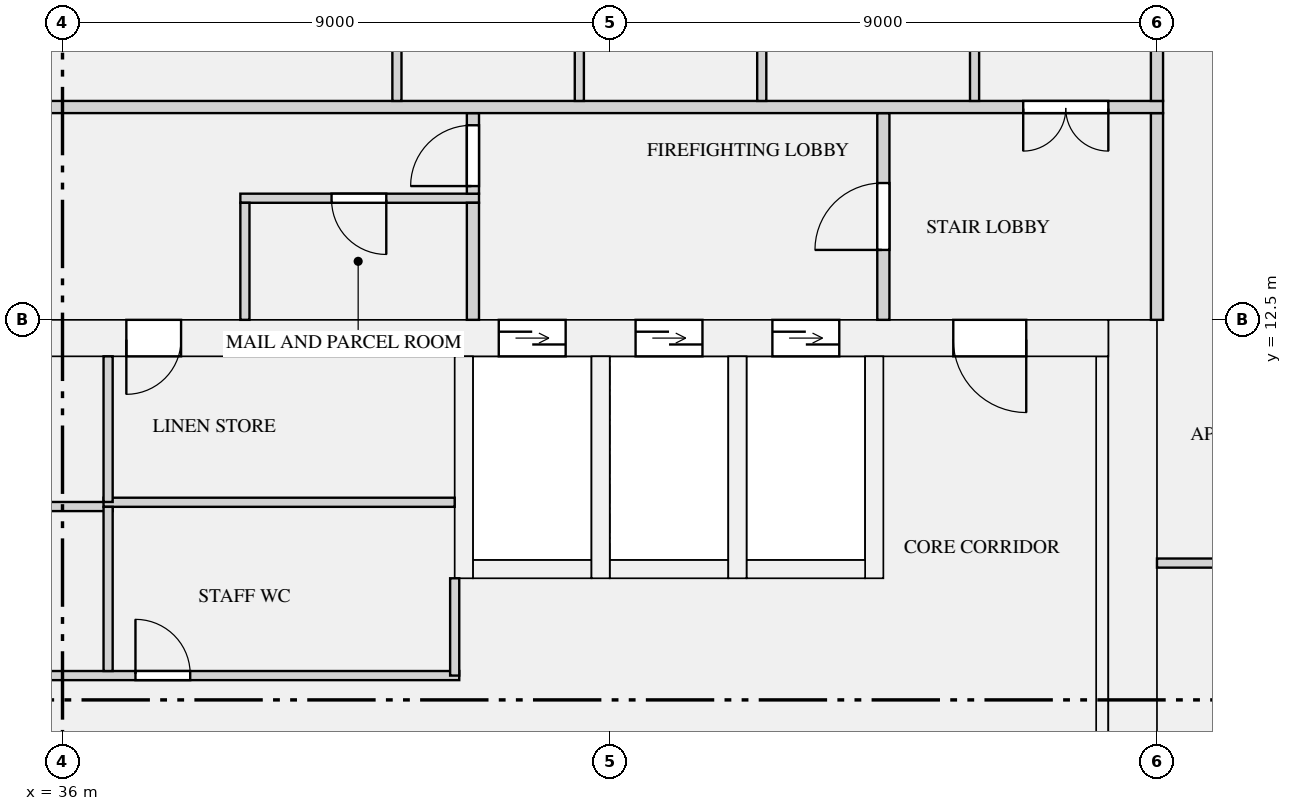
"""IFC4 building model, lengths in metres.
Left out: names, types, materials, properties, quantities, classifications, styles, units other than length and angle.
Written with IfcOpenShell. Run it as: python <this file> out.ifc"""

import sys

from ifc_helpers import new_model, si_unit, direction, frame, frame_2d, origin, place, context, subcontext, project, spatial, rectangle, extrude, element, fill, save


model = new_model("IFC4")
c1 = context("Model", 3, precision=1e-05, world=origin(), true_north=direction((0.0, 1.0)))
c2 = subcontext(c1, "Body", "Model", "MODEL_VIEW")
j1 = project(units=[si_unit("LENGTHUNIT", "METRE"), si_unit("PLANEANGLEUNIT", "RADIAN")], contexts=[c1])
p1 = place(None, origin())
s1 = spatial("IfcSite", under=j1, at=p1, CompositionType="ELEMENT")
p2 = place(p1, origin())
s2 = spatial("IfcBuilding", under=s1, at=p2, CompositionType="ELEMENT")
p3 = place(p2, frame((0.0, 0.0, 124.5)))
s3 = spatial("IfcBuildingStorey", under=s2, at=p3, CompositionType="ELEMENT", Elevation=124.5)
p4 = place(p3, frame((53.6, 0.0, 0.0), z_axis=(0.0, 0.0, 1.0), x_axis=(0.0, 1.0, 0.0)))
e1 = element("IfcWall", 1, at=p4, inside=s3, PredefinedType="SHEAR", context=c2, shape_type="SweptSolid", body=[
    extrude(rectangle(XDim=12.5, YDim=0.8, at=frame_2d((6.25, 0.0))), origin(), (0.0, 0.0, 1.0), 3.15),
])
p5 = place(p3, frame((18.8, 12.2, 0.0), z_axis=(0.0, 0.0, 1.0), x_axis=(1.0, 0.0, 0.0)))
e2 = element("IfcWall", 2, at=p5, inside=s3, PredefinedType="SHEAR", context=c2, shape_type="SweptSolid", body=[
    extrude(rectangle(XDim=34.4, YDim=0.6, at=frame_2d((17.2, 0.0))), origin(), (0.0, 0.0, 1.0), 3.15),
])
p6 = place(p5, frame((24.375, 0.0, 0.0)))
e3 = element("IfcOpeningElement", 3, at=p6, cuts=e2, PredefinedType="OPENING", context=c2, shape_type="SweptSolid", body=[
    extrude(rectangle(XDim=1.1, YDim=2.1, at=frame_2d((0.55, 1.05))), frame((0.0, 0.31, 0.0), z_axis=(0.0, -1.0, 0.0), x_axis=(1.0, 0.0, 0.0)), (0.0, 0.0, 1.0), 0.62),
])
p7 = place(p5, frame((26.625, 0.0, 0.0)))
e4 = element("IfcOpeningElement", 4, at=p7, cuts=e2, PredefinedType="OPENING", context=c2, shape_type="SweptSolid", body=[
    extrude(rectangle(XDim=1.1, YDim=2.1, at=frame_2d((0.55, 1.05))), frame((0.0, 0.31, 0.0), z_axis=(0.0, -1.0, 0.0), x_axis=(1.0, 0.0, 0.0)), (0.0, 0.0, 1.0), 0.62),
])
p8 = place(p5, frame((28.875, 0.0, 0.0)))
e5 = element("IfcOpeningElement", 5, at=p8, cuts=e2, PredefinedType="OPENING", context=c2, shape_type="SweptSolid", body=[
    extrude(rectangle(XDim=1.1, YDim=2.1, at=frame_2d((0.55, 1.05))), frame((0.0, 0.31, 0.0), z_axis=(0.0, -1.0, 0.0), x_axis=(1.0, 0.0, 0.0)), (0.0, 0.0, 1.0), 0.62),
])
p9 = place(p5, frame((4.75, 0.0, 0.0)))
e6 = element("IfcOpeningElement", 6, at=p9, cuts=e2, PredefinedType="OPENING", context=c2, shape_type="SweptSolid", body=[
    extrude(rectangle(XDim=0.9, YDim=2.1, at=frame_2d((0.45, 1.05))), frame((0.0, 0.31, 0.0), z_axis=(0.0, -1.0, 0.0), x_axis=(1.0, 0.0, 0.0)), (0.0, 0.0, 1.0), 0.62),
])
p10 = place(p5, frame((11.75, 0.0, 0.0)))
e7 = element("IfcOpeningElement", 7, at=p10, cuts=e2, PredefinedType="OPENING", context=c2, shape_type="SweptSolid", body=[
    extrude(rectangle(XDim=0.9, YDim=2.1, at=frame_2d((0.45, 1.05))), frame((0.0, 0.31, 0.0), z_axis=(0.0, -1.0, 0.0), x_axis=(1.0, 0.0, 0.0)), (0.0, 0.0, 1.0), 0.62),
])
p11 = place(p5, frame((18.25, 0.0, 0.0)))
e8 = element("IfcOpeningElement", 8, at=p11, cuts=e2, PredefinedType="OPENING", context=c2, shape_type="SweptSolid", body=[
    extrude(rectangle(XDim=0.9, YDim=2.1, at=frame_2d((0.45, 1.05))), frame((0.0, 0.31, 0.0), z_axis=(0.0, -1.0, 0.0), x_axis=(1.0, 0.0, 0.0)), (0.0, 0.0, 1.0), 0.62),
])
p12 = place(p5, frame((1.35, 0.0, 0.0)))
e9 = element("IfcOpeningElement", 9, at=p12, cuts=e2, PredefinedType="OPENING", context=c2, shape_type="SweptSolid", body=[
    extrude(rectangle(XDim=1.2, YDim=2.1, at=frame_2d((0.6, 1.05))), frame((0.0, 0.31, 0.0), z_axis=(0.0, -1.0, 0.0), x_axis=(1.0, 0.0, 0.0)), (0.0, 0.0, 1.0), 0.62),
])
p13 = place(p5, frame((31.85, 0.0, 0.0)))
e10 = element("IfcOpeningElement", 10, at=p13, cuts=e2, PredefinedType="OPENING", context=c2, shape_type="SweptSolid", body=[
    extrude(rectangle(XDim=1.2, YDim=2.1, at=frame_2d((0.6, 1.05))), frame((0.0, 0.31, 0.0), z_axis=(0.0, -1.0, 0.0), x_axis=(1.0, 0.0, 0.0)), (0.0, 0.0, 1.0), 0.62),
])
p14 = place(p3, frame((53.1, 1.0, 0.0), z_axis=(0.0, 0.0, 1.0), x_axis=(0.0, 1.0, 0.0)))
e11 = element("IfcWall", 11, at=p14, inside=s3, PredefinedType="SHEAR", context=c2, shape_type="SweptSolid", body=[
    extrude(rectangle(XDim=10.9, YDim=0.2, at=frame_2d((5.45, 0.0))), origin(), (0.0, 0.0, 1.0), 3.15),
])
p15 = place(p3, frame((42.75, 8.4, 0.0), z_axis=(0.0, 0.0, 1.0), x_axis=(1.0, 0.0, 0.0)))
e12 = element("IfcWall", 12, at=p15, inside=s3, PredefinedType="SHEAR", context=c2, shape_type="SweptSolid", body=[
    extrude(rectangle(XDim=1.95, YDim=0.3, at=frame_2d((0.975, 0.0))), origin(), (0.0, 0.0, 1.0), 3.15),
])
p16 = place(p3, frame((42.6, 8.25, 0.0), z_axis=(0.0, 0.0, 1.0), x_axis=(0.0, 1.0, 0.0)))
e13 = element("IfcWall", 13, at=p16, inside=s3, PredefinedType="SHEAR", context=c2, shape_type="SweptSolid", body=[
    extrude(rectangle(XDim=3.65, YDim=0.3, at=frame_2d((1.825, 0.0))), origin(), (0.0, 0.0, 1.0), 3.15),
])
p17 = place(p3, frame((45.0, 8.4, 0.0), z_axis=(0.0, 0.0, 1.0), x_axis=(1.0, 0.0, 0.0)))
e14 = element("IfcWall", 14, at=p17, inside=s3, PredefinedType="SHEAR", context=c2, shape_type="SweptSolid", body=[
    extrude(rectangle(XDim=1.95, YDim=0.3, at=frame_2d((0.975, 0.0))), origin(), (0.0, 0.0, 1.0), 3.15),
])
p18 = place(p3, frame((44.85, 8.25, 0.0), z_axis=(0.0, 0.0, 1.0), x_axis=(0.0, 1.0, 0.0)))
e15 = element("IfcWall", 15, at=p18, inside=s3, PredefinedType="SHEAR", context=c2, shape_type="SweptSolid", body=[
    extrude(rectangle(XDim=3.65, YDim=0.3, at=frame_2d((1.825, 0.0))), origin(), (0.0, 0.0, 1.0), 3.15),
])
p19 = place(p3, frame((47.25, 8.4, 0.0), z_axis=(0.0, 0.0, 1.0), x_axis=(1.0, 0.0, 0.0)))
e16 = element("IfcWall", 16, at=p19, inside=s3, PredefinedType="SHEAR", context=c2, shape_type="SweptSolid", body=[
    extrude(rectangle(XDim=1.95, YDim=0.3, at=frame_2d((0.975, 0.0))), origin(), (0.0, 0.0, 1.0), 3.15),
])
for number, where, z_axis, x_axis in (
    (17, (47.1, 8.25, 0.0), (0.0, 0.0, 1.0), (0.0, 1.0, 0.0)),
    (18, (49.35, 8.25, 0.0), (0.0, 0.0, 1.0), (0.0, 1.0, 0.0)),
):
    element("IfcWall", number, at=place(p3, frame(where, z_axis=z_axis, x_axis=x_axis)), inside=s3, PredefinedType="SHEAR", context=c2, shape_type="SweptSolid", body=[
        extrude(rectangle(XDim=3.65, YDim=0.3, at=frame_2d((1.825, 0.0))), origin(), (0.0, 0.0, 1.0), 3.15),
    ])
p20 = place(p3, frame((22.725, 6.65, 0.0), z_axis=(0.0, 0.0, 1.0), x_axis=(1.0, 0.0, 0.0)))
e19 = element("IfcWall", 19, at=p20, inside=s3, PredefinedType="PARTITIONING", context=c2, shape_type="SweptSolid", body=[
    extrude(rectangle(XDim=19.8, YDim=0.15, at=frame_2d((9.9, 0.0))), origin(), (0.0, 0.0, 1.0), 2.83),
])
p21 = place(p20, frame((0.825, 0.0, 0.0)))
e20 = element("IfcOpeningElement", 20, at=p21, cuts=e19, PredefinedType="OPENING", context=c2, shape_type="SweptSolid", body=[
    extrude(rectangle(XDim=0.9, YDim=2.1, at=frame_2d((0.45, 1.05))), frame((0.0, 0.085, 0.0), z_axis=(0.0, -1.0, 0.0), x_axis=(1.0, 0.0, 0.0)), (0.0, 0.0, 1.0), 0.17),
])
p22 = place(p20, frame((7.825, 0.0, 0.0)))
e21 = element("IfcOpeningElement", 21, at=p22, cuts=e19, PredefinedType="OPENING", context=c2, shape_type="SweptSolid", body=[
    extrude(rectangle(XDim=0.9, YDim=2.1, at=frame_2d((0.45, 1.05))), frame((0.0, 0.085, 0.0), z_axis=(0.0, -1.0, 0.0), x_axis=(1.0, 0.0, 0.0)), (0.0, 0.0, 1.0), 0.17),
])
p23 = place(p20, frame((14.475, 0.0, 0.0)))
e22 = element("IfcOpeningElement", 22, at=p23, cuts=e19, PredefinedType="OPENING", context=c2, shape_type="SweptSolid", body=[
    extrude(rectangle(XDim=0.9, YDim=2.1, at=frame_2d((0.45, 1.05))), frame((0.0, 0.085, 0.0), z_axis=(0.0, -1.0, 0.0), x_axis=(1.0, 0.0, 0.0)), (0.0, 0.0, 1.0), 0.17),
])
p24 = place(p3, frame((22.725, 9.43, 0.0), z_axis=(0.0, 0.0, 1.0), x_axis=(1.0, 0.0, 0.0)))
e23 = element("IfcWall", 23, at=p24, inside=s3, PredefinedType="PARTITIONING", context=c2, shape_type="SweptSolid", body=[
    extrude(rectangle(XDim=14.1, YDim=0.15, at=frame_2d((7.05, 0.0))), origin(), (0.0, 0.0, 1.0), 2.83),
])
p25 = place(p3, frame((36.675, 9.5, 0.0), z_axis=(0.0, 0.0, 1.0), x_axis=(1.0, 0.0, 0.0)))
e24 = element("IfcWall", 24, at=p25, inside=s3, PredefinedType="PARTITIONING", context=c2, shape_type="SweptSolid", body=[
    extrude(rectangle(XDim=5.775, YDim=0.15, at=frame_2d((2.887, 0.0))), origin(), (0.0, 0.0, 1.0), 2.83),
])
p26 = place(p3, frame((38.925, 14.5, 0.0), z_axis=(0.0, 0.0, 1.0), x_axis=(1.0, 0.0, 0.0)))
e25 = element("IfcWall", 25, at=p26, inside=s3, PredefinedType="PARTITIONING", context=c2, shape_type="SweptSolid", body=[
    extrude(rectangle(XDim=3.925, YDim=0.15, at=frame_2d((1.962, 0.0))), origin(), (0.0, 0.0, 1.0), 2.83),
])
p27 = place(p26, frame((1.5, 0.0, 0.0)))
e26 = element("IfcOpeningElement", 26, at=p27, cuts=e25, PredefinedType="OPENING", context=c2, shape_type="SweptSolid", body=[
    extrude(rectangle(XDim=0.9, YDim=2.1, at=frame_2d((0.45, 1.05))), frame((0.0, 0.085, 0.0), z_axis=(0.0, -1.0, 0.0), x_axis=(1.0, 0.0, 0.0)), (0.0, 0.0, 1.0), 0.17),
])
p28 = place(p3, frame((42.45, 6.65, 0.0), z_axis=(0.0, 0.0, 1.0), x_axis=(0.0, 1.0, 0.0)))
e27 = element("IfcWall", 27, at=p28, inside=s3, PredefinedType="PARTITIONING", context=c2, shape_type="SweptSolid", body=[
    extrude(rectangle(XDim=1.6, YDim=0.15, at=frame_2d((0.8, 0.0))), origin(), (0.0, 0.0, 1.0), 2.83),
])
p29 = place(p3, frame((36.75, 6.725, 0.0), z_axis=(0.0, 0.0, 1.0), x_axis=(0.0, 1.0, 0.0)))
e28 = element("IfcWall", 28, at=p29, inside=s3, PredefinedType="PARTITIONING", context=c2, shape_type="SweptSolid", body=[
    extrude(rectangle(XDim=2.7, YDim=0.15, at=frame_2d((1.35, 0.0))), origin(), (0.0, 0.0, 1.0), 2.83),
])
p30 = place(p3, frame((36.75, 9.505, 0.0), z_axis=(0.0, 0.0, 1.0), x_axis=(0.0, 1.0, 0.0)))
e29 = element("IfcWall", 29, at=p30, inside=s3, PredefinedType="PARTITIONING", context=c2, shape_type="SweptSolid", body=[
    extrude(rectangle(XDim=2.395, YDim=0.15, at=frame_2d((1.198, 0.0))), origin(), (0.0, 0.0, 1.0), 2.83),
])
p31 = place(p3, frame((39.0, 12.5, 0.0), z_axis=(0.0, 0.0, 1.0), x_axis=(0.0, 1.0, 0.0)))
e30 = element("IfcWall", 30, at=p31, inside=s3, PredefinedType="PARTITIONING", context=c2, shape_type="SweptSolid", body=[
    extrude(rectangle(XDim=1.925, YDim=0.15, at=frame_2d((0.962, 0.0))), origin(), (0.0, 0.0, 1.0), 2.83),
])
p32 = place(p3, frame((42.75, 12.5, 0.0), z_axis=(0.0, 0.0, 1.0), x_axis=(0.0, 1.0, 0.0)))
e31 = element("IfcWall", 31, at=p32, inside=s3, PredefinedType="PARTITIONING", context=c2, shape_type="SweptSolid", body=[
    extrude(rectangle(XDim=1.925, YDim=0.2, at=frame_2d((0.962, 0.0))), origin(), (0.0, 0.0, 1.0), 2.83),
])
p33 = place(p3, frame((49.5, 12.5, 0.0), z_axis=(0.0, 0.0, 1.0), x_axis=(0.0, 1.0, 0.0)))
e32 = element("IfcWall", 32, at=p33, inside=s3, PredefinedType="PARTITIONING", context=c2, shape_type="SweptSolid", body=[
    extrude(rectangle(XDim=3.4, YDim=0.2, at=frame_2d((1.7, 0.0))), origin(), (0.0, 0.0, 1.0), 2.83),
])
p34 = place(p33, frame((1.15, 0.0, 0.0)))
e33 = element("IfcOpeningElement", 33, at=p34, cuts=e32, PredefinedType="OPENING", context=c2, shape_type="SweptSolid", body=[
    extrude(rectangle(XDim=1.1, YDim=2.1, at=frame_2d((0.55, 1.05))), frame((0.0, 0.11, 0.0), z_axis=(0.0, -1.0, 0.0), x_axis=(1.0, 0.0, 0.0)), (0.0, 0.0, 1.0), 0.22),
])
p35 = place(p3, frame((54.0, 12.5, 0.0), z_axis=(0.0, 0.0, 1.0), x_axis=(0.0, 1.0, 0.0)))
e34 = element("IfcWall", 34, at=p35, inside=s3, PredefinedType="PARTITIONING", context=c2, shape_type="SweptSolid", body=[
    extrude(rectangle(XDim=3.4, YDim=0.2, at=frame_2d((1.7, 0.0))), origin(), (0.0, 0.0, 1.0), 2.83),
])
p36 = place(p3, frame((42.75, 14.575, 0.0), z_axis=(0.0, 0.0, 1.0), x_axis=(0.0, 1.0, 0.0)))
e35 = element("IfcWall", 35, at=p36, inside=s3, PredefinedType="PARTITIONING", context=c2, shape_type="SweptSolid", body=[
    extrude(rectangle(XDim=1.325, YDim=0.2, at=frame_2d((0.663, 0.0))), origin(), (0.0, 0.0, 1.0), 2.83),
])
p37 = place(p36, frame((0.125, 0.0, 0.0)))
e36 = element("IfcOpeningElement", 36, at=p37, cuts=e35, PredefinedType="OPENING", context=c2, shape_type="SweptSolid", body=[
    extrude(rectangle(XDim=1.0, YDim=2.1, at=frame_2d((0.5, 1.05))), frame((0.0, 0.11, 0.0), z_axis=(0.0, -1.0, 0.0), x_axis=(1.0, 0.0, 0.0)), (0.0, 0.0, 1.0), 0.22),
])
p38 = place(p3, frame((54.0, 8.5, 0.0), z_axis=(0.0, 0.0, 1.0), x_axis=(1.0, 0.0, 0.0)))
e37 = element("IfcWall", 37, at=p38, inside=s3, PredefinedType="PARTITIONING", context=c2, shape_type="SweptSolid", body=[
    extrude(rectangle(XDim=17.925, YDim=0.15, at=frame_2d((8.962, 0.0))), origin(), (0.0, 0.0, 1.0), 2.83),
])
p39 = place(p38, frame((1.8, 0.0, 0.0)))
e38 = element("IfcOpeningElement", 38, at=p39, cuts=e37, PredefinedType="OPENING", context=c2, shape_type="SweptSolid", body=[
    extrude(rectangle(XDim=0.9, YDim=2.1, at=frame_2d((0.45, 1.05))), frame((0.0, 0.085, 0.0), z_axis=(0.0, -1.0, 0.0), x_axis=(1.0, 0.0, 0.0)), (0.0, 0.0, 1.0), 0.17),
])
p40 = place(p38, frame((12.75, 0.0, 0.0)))
e39 = element("IfcOpeningElement", 39, at=p40, cuts=e37, PredefinedType="OPENING", context=c2, shape_type="SweptSolid", body=[
    extrude(rectangle(XDim=1.5, YDim=2.1, at=frame_2d((0.75, 1.05))), frame((0.0, 0.085, 0.0), z_axis=(0.0, -1.0, 0.0), x_axis=(1.0, 0.0, 0.0)), (0.0, 0.0, 1.0), 0.17),
])
p41 = place(p38, frame((6.3, 0.0, 0.0)))
e40 = element("IfcOpeningElement", 40, at=p41, cuts=e37, PredefinedType="OPENING", context=c2, shape_type="SweptSolid", body=[
    extrude(rectangle(XDim=0.9, YDim=2.1, at=frame_2d((0.45, 1.05))), frame((0.0, 0.085, 0.0), z_axis=(0.0, -1.0, 0.0), x_axis=(1.0, 0.0, 0.0)), (0.0, 0.0, 1.0), 0.17),
])
p42 = place(p3, frame((17.9, 16.0, 0.0), z_axis=(0.0, 0.0, 1.0), x_axis=(1.0, 0.0, 0.0)))
e41 = element("IfcWall", 41, at=p42, inside=s3, PredefinedType="PARTITIONING", context=c2, shape_type="SweptSolid", body=[
    extrude(rectangle(XDim=36.2, YDim=0.2, at=frame_2d((18.1, 0.0))), origin(), (0.0, 0.0, 1.0), 2.83),
])
p43 = place(p42, frame((0.9, 0.0, 0.0)))
e42 = element("IfcOpeningElement", 42, at=p43, cuts=e41, PredefinedType="OPENING", context=c2, shape_type="SweptSolid", body=[
    extrude(rectangle(XDim=1.4, YDim=2.1, at=frame_2d((0.7, 1.05))), frame((0.0, 0.11, 0.0), z_axis=(0.0, -1.0, 0.0), x_axis=(1.0, 0.0, 0.0)), (0.0, 0.0, 1.0), 0.22),
])
p44 = place(p42, frame((33.9, 0.0, 0.0)))
e43 = element("IfcOpeningElement", 43, at=p44, cuts=e41, PredefinedType="OPENING", context=c2, shape_type="SweptSolid", body=[
    extrude(rectangle(XDim=1.4, YDim=2.1, at=frame_2d((0.7, 1.05))), frame((0.0, 0.11, 0.0), z_axis=(0.0, -1.0, 0.0), x_axis=(1.0, 0.0, 0.0)), (0.0, 0.0, 1.0), 0.22),
])
p45 = place(p3, frame((54.0, 16.1, 0.0), z_axis=(0.0, 0.0, 1.0), x_axis=(0.0, 1.0, 0.0)))
e44 = element("IfcWall", 44, at=p45, inside=s3, PredefinedType="PARTITIONING", context=c2, shape_type="SweptSolid", body=[
    extrude(rectangle(XDim=7.8, YDim=0.2, at=frame_2d((3.9, 0.0))), origin(), (0.0, 0.0, 1.0), 2.83),
])
p46 = place(p45, frame((2.35, 0.0, 0.0)))
e45 = element("IfcOpeningElement", 45, at=p46, cuts=e44, PredefinedType="OPENING", context=c2, shape_type="SweptSolid", body=[
    extrude(rectangle(XDim=1.1, YDim=2.1, at=frame_2d((0.55, 1.05))), frame((0.0, 0.11, 0.0), z_axis=(0.0, -1.0, 0.0), x_axis=(1.0, 0.0, 0.0)), (0.0, 0.0, 1.0), 0.22),
])
p47 = place(p3, frame((51.0, 16.1, 0.0), z_axis=(0.0, 0.0, 1.0), x_axis=(0.0, 1.0, 0.0)))
e46 = element("IfcWall", 46, at=p47, inside=s3, PredefinedType="PARTITIONING", context=c2, shape_type="SweptSolid", body=[
    extrude(rectangle(XDim=4.825, YDim=0.15, at=frame_2d((2.413, 0.0))), origin(), (0.0, 0.0, 1.0), 2.83),
])
p48 = place(p47, frame((1.95, 0.0, 0.0)))
e47 = element("IfcOpeningElement", 47, at=p48, cuts=e46, PredefinedType="OPENING", context=c2, shape_type="SweptSolid", body=[
    extrude(rectangle(XDim=0.9, YDim=2.1, at=frame_2d((0.45, 1.05))), frame((0.0, 0.085, 0.0), z_axis=(0.0, -1.0, 0.0), x_axis=(1.0, 0.0, 0.0)), (0.0, 0.0, 1.0), 0.17),
])
for number, where, z_axis, x_axis in (
    (48, (41.5, 16.1, 0.0), (0.0, 0.0, 1.0), (0.0, 1.0, 0.0)),
    (49, (44.5, 16.1, 0.0), (0.0, 0.0, 1.0), (0.0, 1.0, 0.0)),
    (50, (47.5, 16.1, 0.0), (0.0, 0.0, 1.0), (0.0, 1.0, 0.0)),
):
    element("IfcWall", number, at=place(p3, frame(where, z_axis=z_axis, x_axis=x_axis)), inside=s3, PredefinedType="PARTITIONING", context=c2, shape_type="SweptSolid", body=[
        extrude(rectangle(XDim=4.825, YDim=0.15, at=frame_2d((2.413, 0.0))), origin(), (0.0, 0.0, 1.0), 2.83),
    ])
p49 = place(p6, origin())
e51 = element("IfcDoor", 51, at=p49, inside=s3, OperationType="DOUBLE_DOOR_SLIDING", PredefinedType="DOOR", context=c2, shape_type="SweptSolid", body=[
    extrude(rectangle(XDim=1.1, YDim=2.1, at=frame_2d((0.55, 1.05))), frame((0.0, 0.025, 0.0), z_axis=(0.0, -1.0, 0.0), x_axis=(1.0, 0.0, 0.0)), (0.0, 0.0, 1.0), 0.05),
])
fill(e3, e51)
p50 = place(p7, origin())
e52 = element("IfcDoor", 52, at=p50, inside=s3, OperationType="DOUBLE_DOOR_SLIDING", PredefinedType="DOOR", context=c2, shape_type="SweptSolid", body=[
    extrude(rectangle(XDim=1.1, YDim=2.1, at=frame_2d((0.55, 1.05))), frame((0.0, 0.025, 0.0), z_axis=(0.0, -1.0, 0.0), x_axis=(1.0, 0.0, 0.0)), (0.0, 0.0, 1.0), 0.05),
])
fill(e4, e52)
p51 = place(p8, origin())
e53 = element("IfcDoor", 53, at=p51, inside=s3, OperationType="DOUBLE_DOOR_SLIDING", PredefinedType="DOOR", context=c2, shape_type="SweptSolid", body=[
    extrude(rectangle(XDim=1.1, YDim=2.1, at=frame_2d((0.55, 1.05))), frame((0.0, 0.025, 0.0), z_axis=(0.0, -1.0, 0.0), x_axis=(1.0, 0.0, 0.0)), (0.0, 0.0, 1.0), 0.05),
])
fill(e5, e53)
p52 = place(p27, frame((0.9, 0.0, 0.0), z_axis=(0.0, 0.0, 1.0), x_axis=(-1.0, 0.0, 0.0)))
e54 = element("IfcDoor", 54, at=p52, inside=s3, OperationType="SINGLE_SWING_LEFT", PredefinedType="DOOR", context=c2, shape_type="SweptSolid", body=[
    extrude(rectangle(XDim=0.9, YDim=2.1, at=frame_2d((0.45, 1.05))), frame((0.0, 0.025, 0.0), z_axis=(0.0, -1.0, 0.0), x_axis=(1.0, 0.0, 0.0)), (0.0, 0.0, 1.0), 0.05),
])
fill(e26, e54)
p53 = place(p23, origin())
e55 = element("IfcDoor", 55, at=p53, inside=s3, OperationType="SINGLE_SWING_LEFT", PredefinedType="DOOR", context=c2, shape_type="SweptSolid", body=[
    extrude(rectangle(XDim=0.9, YDim=2.1, at=frame_2d((0.45, 1.05))), frame((0.0, 0.025, 0.0), z_axis=(0.0, -1.0, 0.0), x_axis=(1.0, 0.0, 0.0)), (0.0, 0.0, 1.0), 0.05),
])
fill(e22, e55)
p54 = place(p11, frame((0.9, 0.0, 0.0), z_axis=(0.0, 0.0, 1.0), x_axis=(-1.0, 0.0, 0.0)))
e56 = element("IfcDoor", 56, at=p54, inside=s3, OperationType="SINGLE_SWING_RIGHT", PredefinedType="DOOR", context=c2, shape_type="SweptSolid", body=[
    extrude(rectangle(XDim=0.9, YDim=2.1, at=frame_2d((0.45, 1.05))), frame((0.0, 0.025, 0.0), z_axis=(0.0, -1.0, 0.0), x_axis=(1.0, 0.0, 0.0)), (0.0, 0.0, 1.0), 0.05),
])
fill(e8, e56)
p55 = place(p13, frame((1.2, 0.0, 0.0), z_axis=(0.0, 0.0, 1.0), x_axis=(-1.0, 0.0, 0.0)))
e57 = element("IfcDoor", 57, at=p55, inside=s3, OperationType="SINGLE_SWING_LEFT", PredefinedType="DOOR", context=c2, shape_type="SweptSolid", body=[
    extrude(rectangle(XDim=1.2, YDim=2.1, at=frame_2d((0.6, 1.05))), frame((0.0, 0.025, 0.0), z_axis=(0.0, -1.0, 0.0), x_axis=(1.0, 0.0, 0.0)), (0.0, 0.0, 1.0), 0.05),
])
fill(e10, e57)
p56 = place(p37, origin())
e58 = element("IfcDoor", 58, at=p56, inside=s3, OperationType="SINGLE_SWING_LEFT", PredefinedType="DOOR", context=c2, shape_type="SweptSolid", body=[
    extrude(rectangle(XDim=1.0, YDim=2.1, at=frame_2d((0.5, 1.05))), frame((0.0, 0.025, 0.0), z_axis=(0.0, -1.0, 0.0), x_axis=(1.0, 0.0, 0.0)), (0.0, 0.0, 1.0), 0.05),
])
fill(e36, e58)
p57 = place(p34, origin())
e59 = element("IfcDoor", 59, at=p57, inside=s3, OperationType="SINGLE_SWING_LEFT", PredefinedType="DOOR", context=c2, shape_type="SweptSolid", body=[
    extrude(rectangle(XDim=1.1, YDim=2.1, at=frame_2d((0.55, 1.05))), frame((0.0, 0.025, 0.0), z_axis=(0.0, -1.0, 0.0), x_axis=(1.0, 0.0, 0.0)), (0.0, 0.0, 1.0), 0.05),
])
fill(e33, e59)
p58 = place(p44, frame((1.4, 0.0, 0.0), z_axis=(0.0, 0.0, 1.0), x_axis=(-1.0, 0.0, 0.0)))
e60 = element("IfcDoor", 60, at=p58, inside=s3, OperationType="DOUBLE_DOOR_SINGLE_SWING", PredefinedType="DOOR", context=c2, shape_type="SweptSolid", body=[
    extrude(rectangle(XDim=1.4, YDim=2.1, at=frame_2d((0.7, 1.05))), frame((0.0, 0.025, 0.0), z_axis=(0.0, -1.0, 0.0), x_axis=(1.0, 0.0, 0.0)), (0.0, 0.0, 1.0), 0.05),
])
fill(e43, e60)
save(model, sys.argv[1])
